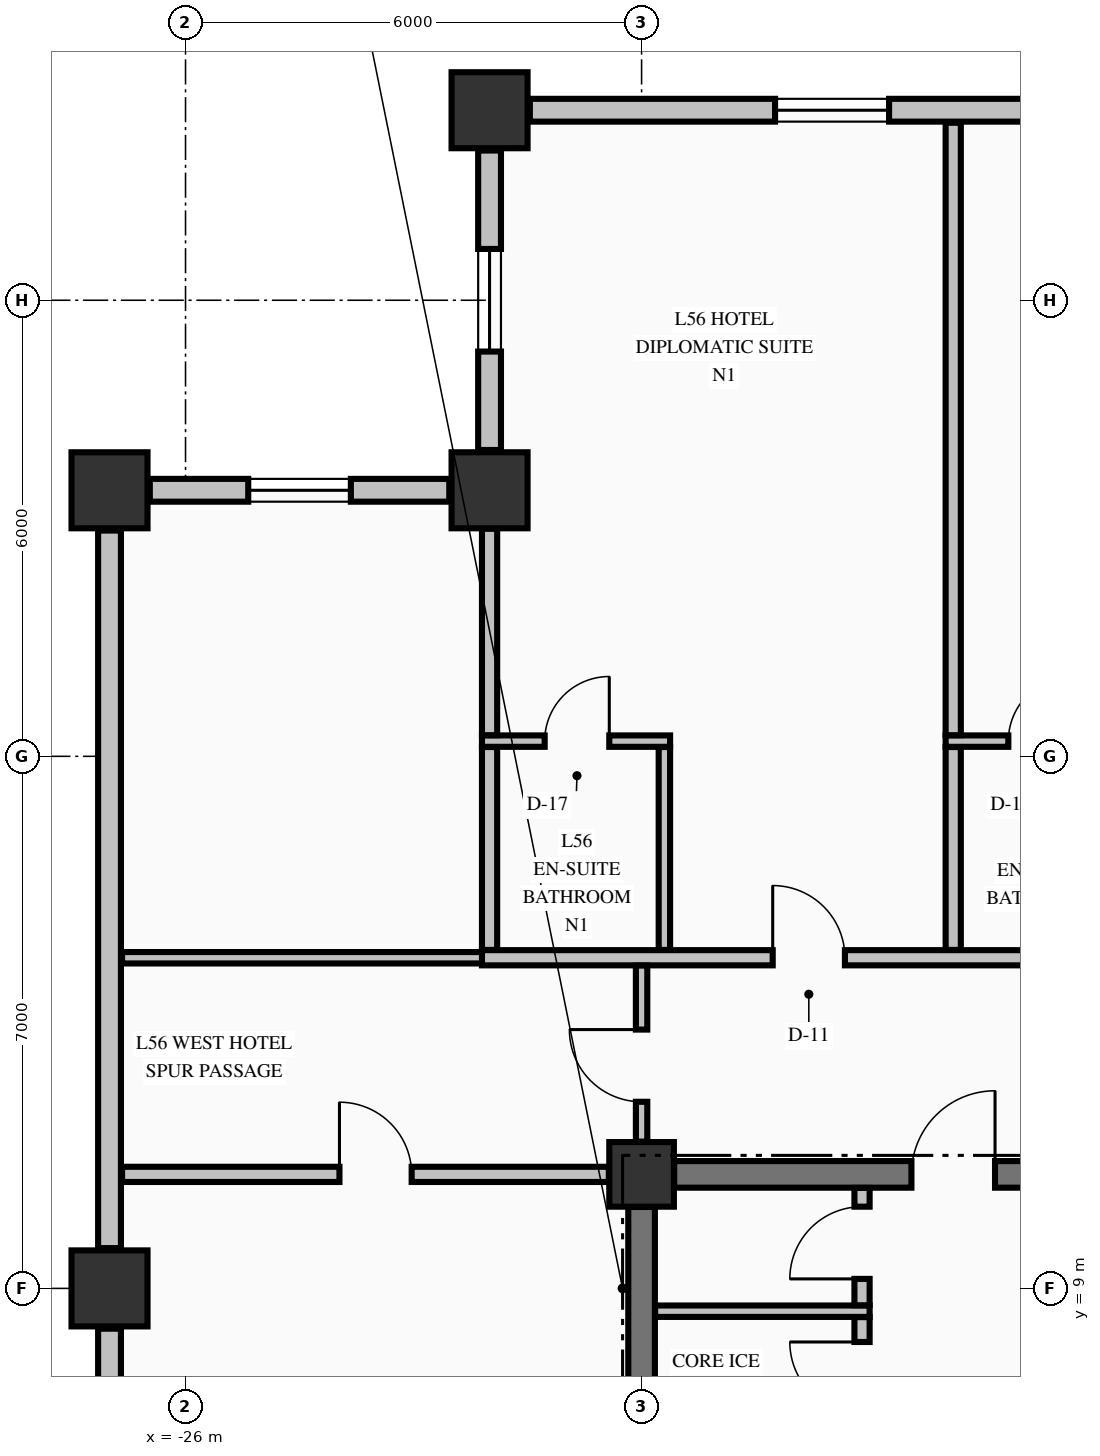
"""IFC4 building model, lengths in metres.
Left out: names, types, materials, properties, quantities, classifications, styles, units other than length and angle.
Written with IfcOpenShell. Run it as: python <this file> out.ifc"""

import sys

from ifc_helpers import new_model, si_unit, direction, frame, frame_2d, origin, origin_2d, place, context, subcontext, project, spatial, rectangle, extrude, element, fill, save


model = new_model("IFC4")
c1 = context("Model", 3, precision=1e-05, world=origin(), true_north=direction((0.0, 1.0)))
c2 = subcontext(c1, "Body", "Model", "MODEL_VIEW")
j1 = project(units=[si_unit("LENGTHUNIT", "METRE"), si_unit("PLANEANGLEUNIT", "RADIAN")], contexts=[c1])
p1 = place(None, origin())
s1 = spatial("IfcSite", under=j1, at=p1, CompositionType="ELEMENT")
p2 = place(p1, origin())
s2 = spatial("IfcBuilding", under=s1, at=p2, CompositionType="ELEMENT")
p3 = place(p2, frame((0.0, 0.0, 215.26)))
s3 = spatial("IfcBuildingStorey", under=s2, at=p3, CompositionType="ELEMENT", Elevation=215.26)
for number, where, z_axis, x_axis in (
    (1, (-22.0, 24.5, -0.25), (0.0, 0.0, 1.0), (1.0, 0.0, 0.0)),
    (2, (-27.0, 9.0, -0.25), (0.0, 0.0, 1.0), (1.0, 0.0, 0.0)),
    (3, (-27.0, 19.5, -0.25), (0.0, 0.0, 1.0), (1.0, 0.0, 0.0)),
    (4, (-22.0, 19.5, -0.25), (0.0, 0.0, 1.0), (1.0, 0.0, 0.0)),
):
    element("IfcColumn", number, at=place(p3, frame(where, z_axis=z_axis, x_axis=x_axis)), inside=s3, PredefinedType="COLUMN", context=c2, shape_type="SweptSolid", body=[
        extrude(rectangle(XDim=1.0, YDim=1.0, at=origin_2d()), origin(), (0.0, 0.0, 1.0), 3.4),
    ])
p4 = place(p3, frame((-20.0, 10.5, -0.25), z_axis=(0.0, 0.0, 1.0), x_axis=(1.0, 0.0, 0.0)))
e5 = element("IfcColumn", 5, at=p4, inside=s3, PredefinedType="COLUMN", context=c2, shape_type="SweptSolid", body=[
    extrude(rectangle(XDim=0.85, YDim=0.85, at=origin_2d()), origin(), (0.0, 0.0, 1.0), 3.4),
])
p5 = place(p3, frame((-22.0, 23.97, 0.0), z_axis=(0.0, 0.0, 1.0), x_axis=(0.0, -1.0, 0.0)))
e6 = element("IfcWall", 6, at=p5, inside=s3, PredefinedType="STANDARD", context=c2, shape_type="SweptSolid", body=[
    extrude(rectangle(XDim=3.94, YDim=0.3, at=frame_2d((1.97, 0.0))), origin(), (0.0, 0.0, 1.0), 2.542),
])
p6 = place(p5, frame((1.295, 0.0, 0.68)))
e7 = element("IfcOpeningElement", 7, at=p6, cuts=e6, PredefinedType="OPENING", context=c2, shape_type="SweptSolid", body=[
    extrude(rectangle(XDim=1.35, YDim=1.42, at=frame_2d((0.675, 0.71))), frame((0.0, 0.16, 0.0), z_axis=(0.0, -1.0, 0.0), x_axis=(1.0, 0.0, 0.0)), (0.0, 0.0, 1.0), 0.32),
])
p7 = place(p3, frame((-22.53, 19.5, 0.0), z_axis=(0.0, 0.0, 1.0), x_axis=(-1.0, 0.0, 0.0)))
e8 = element("IfcWall", 8, at=p7, inside=s3, PredefinedType="STANDARD", context=c2, shape_type="SweptSolid", body=[
    extrude(rectangle(XDim=3.94, YDim=0.3, at=frame_2d((1.97, 0.0))), origin(), (0.0, 0.0, 1.0), 2.542),
])
p8 = place(p7, frame((1.295, 0.0, 0.68)))
e9 = element("IfcOpeningElement", 9, at=p8, cuts=e8, PredefinedType="OPENING", context=c2, shape_type="SweptSolid", body=[
    extrude(rectangle(XDim=1.35, YDim=1.42, at=frame_2d((0.675, 0.71))), frame((0.0, 0.16, 0.0), z_axis=(0.0, -1.0, 0.0), x_axis=(1.0, 0.0, 0.0)), (0.0, 0.0, 1.0), 0.32),
])
p9 = place(p3, frame((-11.53, 24.5, 0.0), z_axis=(0.0, 0.0, 1.0), x_axis=(-1.0, 0.0, 0.0)))
e10 = element("IfcWall", 10, at=p9, inside=s3, PredefinedType="STANDARD", context=c2, shape_type="SweptSolid", body=[
    extrude(rectangle(XDim=9.94, YDim=0.3, at=frame_2d((4.97, 0.0))), origin(), (0.0, 0.0, 1.0), 2.542),
])
p10 = place(p9, frame((1.238, 0.0, 0.72)))
e11 = element("IfcOpeningElement", 11, at=p10, cuts=e10, PredefinedType="OPENING", context=c2, shape_type="SweptSolid", body=[
    extrude(rectangle(XDim=1.5, YDim=1.6, at=frame_2d((0.75, 0.8))), frame((0.0, 0.16, 0.0), z_axis=(0.0, -1.0, 0.0), x_axis=(1.0, 0.0, 0.0)), (0.0, 0.0, 1.0), 0.32),
])
p11 = place(p9, frame((5.214, 0.0, 0.72)))
e12 = element("IfcOpeningElement", 12, at=p11, cuts=e10, PredefinedType="OPENING", context=c2, shape_type="SweptSolid", body=[
    extrude(rectangle(XDim=1.5, YDim=1.6, at=frame_2d((0.75, 0.8))), frame((0.0, 0.16, 0.0), z_axis=(0.0, -1.0, 0.0), x_axis=(1.0, 0.0, 0.0)), (0.0, 0.0, 1.0), 0.32),
])
p12 = place(p3, frame((-27.0, 8.47, 0.0), z_axis=(0.0, 0.0, 1.0), x_axis=(0.0, -1.0, 0.0)))
e13 = element("IfcWall", 13, at=p12, inside=s3, PredefinedType="STANDARD", context=c2, shape_type="SweptSolid", body=[
    extrude(rectangle(XDim=7.94, YDim=0.3, at=frame_2d((3.97, 0.0))), origin(), (0.0, 0.0, 1.0), 2.542),
])
p13 = place(p12, frame((1.235, 0.0, 0.72)))
e14 = element("IfcOpeningElement", 14, at=p13, cuts=e13, PredefinedType="OPENING", context=c2, shape_type="SweptSolid", body=[
    extrude(rectangle(XDim=1.5, YDim=1.6, at=frame_2d((0.75, 0.8))), frame((0.0, 0.16, 0.0), z_axis=(0.0, -1.0, 0.0), x_axis=(1.0, 0.0, 0.0)), (0.0, 0.0, 1.0), 0.32),
])
p14 = place(p12, frame((3.22, 0.0, 0.72)))
e15 = element("IfcOpeningElement", 15, at=p14, cuts=e13, PredefinedType="OPENING", context=c2, shape_type="SweptSolid", body=[
    extrude(rectangle(XDim=1.5, YDim=1.6, at=frame_2d((0.75, 0.8))), frame((0.0, 0.16, 0.0), z_axis=(0.0, -1.0, 0.0), x_axis=(1.0, 0.0, 0.0)), (0.0, 0.0, 1.0), 0.32),
])
p15 = place(p12, frame((5.205, 0.0, 0.72)))
e16 = element("IfcOpeningElement", 16, at=p15, cuts=e13, PredefinedType="OPENING", context=c2, shape_type="SweptSolid", body=[
    extrude(rectangle(XDim=1.5, YDim=1.6, at=frame_2d((0.75, 0.8))), frame((0.0, 0.16, 0.0), z_axis=(0.0, -1.0, 0.0), x_axis=(1.0, 0.0, 0.0)), (0.0, 0.0, 1.0), 0.32),
])
p16 = place(p3, frame((-27.0, 18.97, 0.0), z_axis=(0.0, 0.0, 1.0), x_axis=(0.0, -1.0, 0.0)))
e17 = element("IfcWall", 17, at=p16, inside=s3, PredefinedType="STANDARD", context=c2, shape_type="SweptSolid", body=[
    extrude(rectangle(XDim=9.44, YDim=0.3, at=frame_2d((4.72, 0.0))), origin(), (0.0, 0.0, 1.0), 2.542),
])
p17 = place(p3, frame((-19.571, 10.5, 0.0), z_axis=(0.0, 0.0, 1.0), x_axis=(1.0, 0.0, 0.0)))
e18 = element("IfcWall", 18, at=p17, inside=s3, PredefinedType="SHEAR", context=c2, shape_type="SweptSolid", body=[
    extrude(rectangle(XDim=4.871, YDim=0.35, at=frame_2d((2.436, 0.0))), origin(), (0.0, 0.0, 1.0), 3.15),
])
p18 = place(p17, frame((3.121, 0.0, 0.0)))
e19 = element("IfcOpeningElement", 19, at=p18, cuts=e18, PredefinedType="OPENING", context=c2, shape_type="SweptSolid", body=[
    extrude(rectangle(XDim=1.1, YDim=2.15, at=frame_2d((0.55, 1.075))), frame((0.0, 0.185, 0.0), z_axis=(0.0, -1.0, 0.0), x_axis=(1.0, 0.0, 0.0)), (0.0, 0.0, 1.0), 0.37),
])
p19 = place(p3, frame((-19.822, 8.7, 0.0), z_axis=(0.0, 0.0, 1.0), x_axis=(1.0, 0.0, 0.0)))
e20 = element("IfcWall", 20, at=p19, inside=s3, PredefinedType="PARTITIONING", context=c2, shape_type="SweptSolid", body=[
    extrude(rectangle(XDim=2.822, YDim=0.15, at=frame_2d((1.411, 0.0))), origin(), (0.0, 0.0, 1.0), 3.15),
])
p20 = place(p3, frame((-26.835, 10.5, 0.0), z_axis=(0.0, 0.0, 1.0), x_axis=(1.0, 0.0, 0.0)))
e21 = element("IfcWall", 21, at=p20, inside=s3, PredefinedType="PARTITIONING", context=c2, shape_type="SweptSolid", body=[
    extrude(rectangle(XDim=6.404, YDim=0.2, at=frame_2d((3.202, 0.0))), origin(), (0.0, 0.0, 1.0), 3.15),
])
p21 = place(p20, frame((2.86, 0.0, 0.0)))
e22 = element("IfcOpeningElement", 22, at=p21, cuts=e21, PredefinedType="OPENING", context=c2, shape_type="SweptSolid", body=[
    extrude(rectangle(XDim=0.95, YDim=2.15, at=frame_2d((0.475, 1.075))), frame((0.0, 0.11, 0.0), z_axis=(0.0, -1.0, 0.0), x_axis=(1.0, 0.0, 0.0)), (0.0, 0.0, 1.0), 0.22),
])
p22 = place(p3, frame((-26.835, 13.35, 0.0), z_axis=(0.0, 0.0, 1.0), x_axis=(1.0, 0.0, 0.0)))
e23 = element("IfcWall", 23, at=p22, inside=s3, PredefinedType="PARTITIONING", context=c2, shape_type="SweptSolid", body=[
    extrude(rectangle(XDim=4.935, YDim=0.15, at=frame_2d((2.468, 0.0))), origin(), (0.0, 0.0, 1.0), 3.15),
])
p23 = place(p3, frame((-22.1, 13.35, 0.0), z_axis=(0.0, 0.0, 1.0), x_axis=(1.0, 0.0, 0.0)))
e24 = element("IfcWall", 24, at=p23, inside=s3, PredefinedType="PARTITIONING", context=c2, shape_type="SweptSolid", body=[
    extrude(rectangle(XDim=39.2, YDim=0.2, at=frame_2d((19.6, 0.0))), origin(), (0.0, 0.0, 1.0), 3.15),
])
p24 = place(p23, frame((3.825, 0.0, 0.0)))
e25 = element("IfcOpeningElement", 25, at=p24, cuts=e24, PredefinedType="OPENING", context=c2, shape_type="SweptSolid", body=[
    extrude(rectangle(XDim=0.95, YDim=2.15, at=frame_2d((0.475, 1.075))), frame((0.0, 0.11, 0.0), z_axis=(0.0, -1.0, 0.0), x_axis=(1.0, 0.0, 0.0)), (0.0, 0.0, 1.0), 0.22),
])
p25 = place(p23, frame((11.075, 0.0, 0.0)))
e26 = element("IfcOpeningElement", 26, at=p25, cuts=e24, PredefinedType="OPENING", context=c2, shape_type="SweptSolid", body=[
    extrude(rectangle(XDim=0.95, YDim=2.15, at=frame_2d((0.475, 1.075))), frame((0.0, 0.11, 0.0), z_axis=(0.0, -1.0, 0.0), x_axis=(1.0, 0.0, 0.0)), (0.0, 0.0, 1.0), 0.22),
])
p26 = place(p23, frame((18.475, 0.0, 0.0)))
e27 = element("IfcOpeningElement", 27, at=p26, cuts=e24, PredefinedType="OPENING", context=c2, shape_type="SweptSolid", body=[
    extrude(rectangle(XDim=0.95, YDim=2.15, at=frame_2d((0.475, 1.075))), frame((0.0, 0.11, 0.0), z_axis=(0.0, -1.0, 0.0), x_axis=(1.0, 0.0, 0.0)), (0.0, 0.0, 1.0), 0.22),
])
p27 = place(p23, frame((26.475, 0.0, 0.0)))
e28 = element("IfcOpeningElement", 28, at=p27, cuts=e24, PredefinedType="OPENING", context=c2, shape_type="SweptSolid", body=[
    extrude(rectangle(XDim=0.95, YDim=2.15, at=frame_2d((0.475, 1.075))), frame((0.0, 0.11, 0.0), z_axis=(0.0, -1.0, 0.0), x_axis=(1.0, 0.0, 0.0)), (0.0, 0.0, 1.0), 0.22),
])
p28 = place(p23, frame((34.825, 0.0, 0.0)))
e29 = element("IfcOpeningElement", 29, at=p28, cuts=e24, PredefinedType="OPENING", context=c2, shape_type="SweptSolid", body=[
    extrude(rectangle(XDim=0.95, YDim=2.15, at=frame_2d((0.475, 1.075))), frame((0.0, 0.11, 0.0), z_axis=(0.0, -1.0, 0.0), x_axis=(1.0, 0.0, 0.0)), (0.0, 0.0, 1.0), 0.22),
])
p29 = place(p3, frame((-22.1, 16.2, 0.0), z_axis=(0.0, 0.0, 1.0), x_axis=(1.0, 0.0, 0.0)))
e30 = element("IfcWall", 30, at=p29, inside=s3, PredefinedType="PARTITIONING", context=c2, shape_type="SweptSolid", body=[
    extrude(rectangle(XDim=2.475, YDim=0.15, at=frame_2d((1.238, 0.0))), origin(), (0.0, 0.0, 1.0), 3.15),
])
p30 = place(p29, frame((0.825, 0.0, 0.0)))
e31 = element("IfcOpeningElement", 31, at=p30, cuts=e30, PredefinedType="OPENING", context=c2, shape_type="SweptSolid", body=[
    extrude(rectangle(XDim=0.85, YDim=2.1, at=frame_2d((0.425, 1.05))), frame((0.0, 0.085, 0.0), z_axis=(0.0, -1.0, 0.0), x_axis=(1.0, 0.0, 0.0)), (0.0, 0.0, 1.0), 0.17),
])
p31 = place(p3, frame((-16.0, 16.2, 0.0), z_axis=(0.0, 0.0, 1.0), x_axis=(1.0, 0.0, 0.0)))
e32 = element("IfcWall", 32, at=p31, inside=s3, PredefinedType="PARTITIONING", context=c2, shape_type="SweptSolid", body=[
    extrude(rectangle(XDim=2.475, YDim=0.15, at=frame_2d((1.238, 0.0))), origin(), (0.0, 0.0, 1.0), 3.15),
])
p32 = place(p31, frame((0.825, 0.0, 0.0)))
e33 = element("IfcOpeningElement", 33, at=p32, cuts=e32, PredefinedType="OPENING", context=c2, shape_type="SweptSolid", body=[
    extrude(rectangle(XDim=0.85, YDim=2.1, at=frame_2d((0.425, 1.05))), frame((0.0, 0.085, 0.0), z_axis=(0.0, -1.0, 0.0), x_axis=(1.0, 0.0, 0.0)), (0.0, 0.0, 1.0), 0.17),
])
p33 = place(p3, frame((-20.0, 5.327, 0.0), z_axis=(0.0, 0.0, 1.0), x_axis=(0.0, 1.0, 0.0)))
e34 = element("IfcWall", 34, at=p33, inside=s3, PredefinedType="SHEAR", context=c2, shape_type="SweptSolid", body=[
    extrude(rectangle(XDim=4.744, YDim=0.35, at=frame_2d((2.372, 0.0))), origin(), (0.0, 0.0, 1.0), 3.15),
])
p34 = place(p3, frame((-22.0, 13.453, 0.0), z_axis=(0.0, 0.0, 1.0), x_axis=(0.0, 1.0, 0.0)))
e35 = element("IfcWall", 35, at=p34, inside=s3, PredefinedType="PARTITIONING", context=c2, shape_type="SweptSolid", body=[
    extrude(rectangle(XDim=2.669, YDim=0.2, at=frame_2d((1.334, 0.0))), origin(), (0.0, 0.0, 1.0), 3.15),
])
p35 = place(p3, frame((-22.0, 16.278, 0.0), z_axis=(0.0, 0.0, 1.0), x_axis=(0.0, 1.0, 0.0)))
e36 = element("IfcWall", 36, at=p35, inside=s3, PredefinedType="PARTITIONING", context=c2, shape_type="SweptSolid", body=[
    extrude(rectangle(XDim=2.716, YDim=0.2, at=frame_2d((1.358, 0.0))), origin(), (0.0, 0.0, 1.0), 3.15),
])
p36 = place(p3, frame((-20.0, 10.931, 0.0), z_axis=(0.0, 0.0, 1.0), x_axis=(0.0, 1.0, 0.0)))
e37 = element("IfcWall", 37, at=p36, inside=s3, PredefinedType="PARTITIONING", context=c2, shape_type="SweptSolid", body=[
    extrude(rectangle(XDim=2.316, YDim=0.15, at=frame_2d((1.158, 0.0))), origin(), (0.0, 0.0, 1.0), 2.342),
])
p37 = place(p36, frame((0.524, 0.0, 0.0)))
e38 = element("IfcOpeningElement", 38, at=p37, cuts=e37, PredefinedType="OPENING", context=c2, shape_type="SweptSolid", body=[
    extrude(rectangle(XDim=0.95, YDim=2.15, at=frame_2d((0.475, 1.075))), frame((0.0, 0.085, 0.0), z_axis=(0.0, -1.0, 0.0), x_axis=(1.0, 0.0, 0.0)), (0.0, 0.0, 1.0), 0.17),
])
p38 = place(p3, frame((-19.7, 13.453, 0.0), z_axis=(0.0, 0.0, 1.0), x_axis=(0.0, 1.0, 0.0)))
e39 = element("IfcWall", 39, at=p38, inside=s3, PredefinedType="PARTITIONING", context=c2, shape_type="SweptSolid", body=[
    extrude(rectangle(XDim=2.669, YDim=0.15, at=frame_2d((1.334, 0.0))), origin(), (0.0, 0.0, 1.0), 2.342),
])
p39 = place(p3, frame((-17.1, 7.028, 0.0), z_axis=(0.0, 0.0, 1.0), x_axis=(0.0, 1.0, 0.0)))
e40 = element("IfcWall", 40, at=p39, inside=s3, PredefinedType="PARTITIONING", context=c2, shape_type="SweptSolid", body=[
    extrude(rectangle(XDim=1.594, YDim=0.2, at=frame_2d((0.797, 0.0))), origin(), (0.0, 0.0, 1.0), 3.15),
])
p40 = place(p39, frame((0.317, 0.0, 0.0)))
e41 = element("IfcOpeningElement", 41, at=p40, cuts=e40, PredefinedType="OPENING", context=c2, shape_type="SweptSolid", body=[
    extrude(rectangle(XDim=0.95, YDim=2.15, at=frame_2d((0.475, 1.075))), frame((0.0, 0.11, 0.0), z_axis=(0.0, -1.0, 0.0), x_axis=(1.0, 0.0, 0.0)), (0.0, 0.0, 1.0), 0.22),
])
p41 = place(p3, frame((-17.1, 8.778, 0.0), z_axis=(0.0, 0.0, 1.0), x_axis=(0.0, 1.0, 0.0)))
e42 = element("IfcWall", 42, at=p41, inside=s3, PredefinedType="PARTITIONING", context=c2, shape_type="SweptSolid", body=[
    extrude(rectangle(XDim=1.544, YDim=0.2, at=frame_2d((0.772, 0.0))), origin(), (0.0, 0.0, 1.0), 3.15),
])
p42 = place(p41, frame((0.347, 0.0, 0.0)))
e43 = element("IfcOpeningElement", 43, at=p42, cuts=e42, PredefinedType="OPENING", context=c2, shape_type="SweptSolid", body=[
    extrude(rectangle(XDim=0.95, YDim=2.15, at=frame_2d((0.475, 1.075))), frame((0.0, 0.11, 0.0), z_axis=(0.0, -1.0, 0.0), x_axis=(1.0, 0.0, 0.0)), (0.0, 0.0, 1.0), 0.22),
])
p43 = place(p3, frame((-15.9, 13.453, 0.0), z_axis=(0.0, 0.0, 1.0), x_axis=(0.0, 1.0, 0.0)))
e44 = element("IfcWall", 44, at=p43, inside=s3, PredefinedType="PARTITIONING", context=c2, shape_type="SweptSolid", body=[
    extrude(rectangle(XDim=2.669, YDim=0.2, at=frame_2d((1.334, 0.0))), origin(), (0.0, 0.0, 1.0), 3.15),
])
p44 = place(p3, frame((-15.9, 16.278, 0.0), z_axis=(0.0, 0.0, 1.0), x_axis=(0.0, 1.0, 0.0)))
e45 = element("IfcWall", 45, at=p44, inside=s3, PredefinedType="PARTITIONING", context=c2, shape_type="SweptSolid", body=[
    extrude(rectangle(XDim=8.057, YDim=0.2, at=frame_2d((4.028, 0.0))), origin(), (0.0, 0.0, 1.0), 3.15),
])
p45 = place(p6, origin())
e46 = element("IfcWindow", 46, at=p45, inside=s3, PartitioningType="SINGLE_PANEL", PredefinedType="WINDOW", context=c2, shape_type="SweptSolid", body=[
    extrude(rectangle(XDim=1.35, YDim=1.42, at=frame_2d((0.675, 0.71))), frame((0.0, 0.03, 0.0), z_axis=(0.0, -1.0, 0.0), x_axis=(1.0, 0.0, 0.0)), (0.0, 0.0, 1.0), 0.06),
])
fill(e7, e46)
p46 = place(p8, origin())
e47 = element("IfcWindow", 47, at=p46, inside=s3, PartitioningType="SINGLE_PANEL", PredefinedType="WINDOW", context=c2, shape_type="SweptSolid", body=[
    extrude(rectangle(XDim=1.35, YDim=1.42, at=frame_2d((0.675, 0.71))), frame((0.0, 0.03, 0.0), z_axis=(0.0, -1.0, 0.0), x_axis=(1.0, 0.0, 0.0)), (0.0, 0.0, 1.0), 0.06),
])
fill(e9, e47)
p47 = place(p11, origin())
e48 = element("IfcWindow", 48, at=p47, inside=s3, PartitioningType="SINGLE_PANEL", PredefinedType="WINDOW", context=c2, shape_type="SweptSolid", body=[
    extrude(rectangle(XDim=1.5, YDim=1.6, at=frame_2d((0.75, 0.8))), frame((0.0, 0.03, 0.0), z_axis=(0.0, -1.0, 0.0), x_axis=(1.0, 0.0, 0.0)), (0.0, 0.0, 1.0), 0.06),
])
fill(e12, e48)
p48 = place(p18, origin())
e49 = element("IfcDoor", 49, at=p48, inside=s3, OperationType="SINGLE_SWING_RIGHT", PredefinedType="DOOR", context=c2, shape_type="SweptSolid", body=[
    extrude(rectangle(XDim=1.1, YDim=2.15, at=frame_2d((0.55, 1.075))), frame((0.0, 0.025, 0.0), z_axis=(0.0, -1.0, 0.0), x_axis=(1.0, 0.0, 0.0)), (0.0, 0.0, 1.0), 0.05),
])
fill(e19, e49)
p49 = place(p42, origin())
e50 = element("IfcDoor", 50, at=p49, inside=s3, OperationType="SINGLE_SWING_LEFT", PredefinedType="DOOR", context=c2, shape_type="SweptSolid", body=[
    extrude(rectangle(XDim=0.95, YDim=2.15, at=frame_2d((0.475, 1.075))), frame((0.0, 0.025, 0.0), z_axis=(0.0, -1.0, 0.0), x_axis=(1.0, 0.0, 0.0)), (0.0, 0.0, 1.0), 0.05),
])
fill(e43, e50)
p50 = place(p40, origin())
e51 = element("IfcDoor", 51, at=p50, inside=s3, OperationType="SINGLE_SWING_RIGHT", PredefinedType="DOOR", context=c2, shape_type="SweptSolid", body=[
    extrude(rectangle(XDim=0.95, YDim=2.15, at=frame_2d((0.475, 1.075))), frame((0.0, 0.025, 0.0), z_axis=(0.0, -1.0, 0.0), x_axis=(1.0, 0.0, 0.0)), (0.0, 0.0, 1.0), 0.05),
])
fill(e41, e51)
p51 = place(p24, origin())
e52 = element("IfcDoor", 52, at=p51, inside=s3, OperationType="SINGLE_SWING_LEFT", PredefinedType="DOOR", context=c2, shape_type="SweptSolid", body=[
    extrude(rectangle(XDim=0.95, YDim=2.15, at=frame_2d((0.475, 1.075))), frame((0.0, 0.025, 0.0), z_axis=(0.0, -1.0, 0.0), x_axis=(1.0, 0.0, 0.0)), (0.0, 0.0, 1.0), 0.05),
])
fill(e25, e52)
p52 = place(p30, origin())
e53 = element("IfcDoor", 53, at=p52, inside=s3, OperationType="SINGLE_SWING_RIGHT", PredefinedType="DOOR", context=c2, shape_type="SweptSolid", body=[
    extrude(rectangle(XDim=0.85, YDim=2.1, at=frame_2d((0.425, 1.05))), frame((0.0, 0.025, 0.0), z_axis=(0.0, -1.0, 0.0), x_axis=(1.0, 0.0, 0.0)), (0.0, 0.0, 1.0), 0.05),
])
fill(e31, e53)
p53 = place(p32, origin())
e54 = element("IfcDoor", 54, at=p53, inside=s3, OperationType="SINGLE_SWING_RIGHT", PredefinedType="DOOR", context=c2, shape_type="SweptSolid", body=[
    extrude(rectangle(XDim=0.85, YDim=2.1, at=frame_2d((0.425, 1.05))), frame((0.0, 0.025, 0.0), z_axis=(0.0, -1.0, 0.0), x_axis=(1.0, 0.0, 0.0)), (0.0, 0.0, 1.0), 0.05),
])
fill(e33, e54)
p54 = place(p37, origin())
e55 = element("IfcDoor", 55, at=p54, inside=s3, OperationType="SINGLE_SWING_RIGHT", PredefinedType="DOOR", context=c2, shape_type="SweptSolid", body=[
    extrude(rectangle(XDim=0.95, YDim=2.15, at=frame_2d((0.475, 1.075))), frame((0.0, 0.025, 0.0), z_axis=(0.0, -1.0, 0.0), x_axis=(1.0, 0.0, 0.0)), (0.0, 0.0, 1.0), 0.05),
])
fill(e38, e55)
p55 = place(p21, origin())
e56 = element("IfcDoor", 56, at=p55, inside=s3, OperationType="SINGLE_SWING_LEFT", PredefinedType="DOOR", context=c2, shape_type="SweptSolid", body=[
    extrude(rectangle(XDim=0.95, YDim=2.15, at=frame_2d((0.475, 1.075))), frame((0.0, 0.025, 0.0), z_axis=(0.0, -1.0, 0.0), x_axis=(1.0, 0.0, 0.0)), (0.0, 0.0, 1.0), 0.05),
])
fill(e22, e56)
save(model, sys.argv[1])
